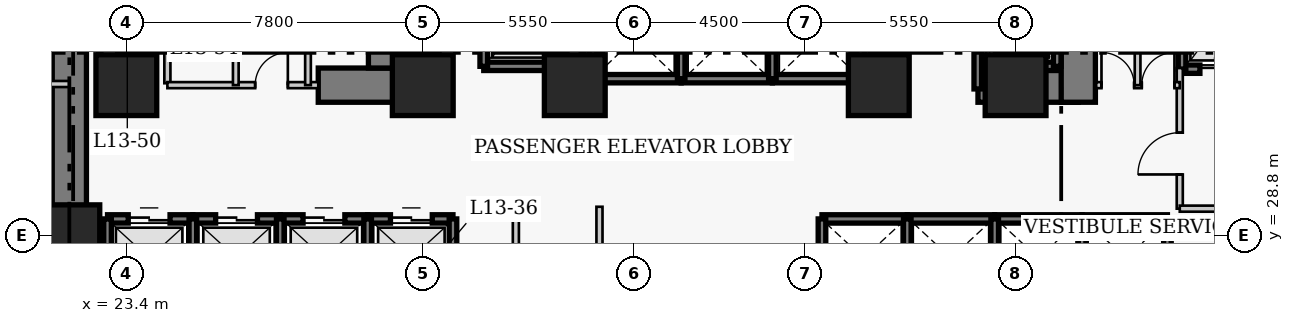
"""IFC4 building model, lengths in metres.
Left out: names, types, materials, properties, quantities, classifications, styles, units other than length and angle.
Written with IfcOpenShell. Run it as: python <this file> out.ifc"""

import sys

from ifc_helpers import new_model, si_unit, direction, frame, frame_2d, origin, origin_2d, place, context, subcontext, project, spatial, rectangle, extrude, element, fill, save


model = new_model("IFC4")
c1 = context("Model", 3, precision=1e-05, world=origin(), true_north=direction((0.0, 1.0)))
c2 = subcontext(c1, "Body", "Model", "MODEL_VIEW")
j1 = project(units=[si_unit("LENGTHUNIT", "METRE"), si_unit("PLANEANGLEUNIT", "RADIAN")], contexts=[c1])
p1 = place(None, origin())
s1 = spatial("IfcSite", under=j1, at=p1, CompositionType="ELEMENT")
p2 = place(p1, origin())
s2 = spatial("IfcBuilding", under=s1, at=p2, CompositionType="ELEMENT")
p3 = place(p2, frame((0.0, 0.0, 56.4)))
s3 = spatial("IfcBuildingStorey", under=s2, at=p3, CompositionType="ELEMENT", Elevation=56.4)
p4 = place(p3, frame((21.9, 27.05, 0.0), z_axis=(0.0, 0.0, 1.0), x_axis=(0.0, 1.0, 0.0)))
e1 = element("IfcWall", 1, at=p4, inside=s3, PredefinedType="SHEAR", context=c2, shape_type="SweptSolid", body=[
    extrude(rectangle(XDim=13.72, YDim=0.9, at=frame_2d((6.86, 0.0))), origin(), (0.0, 0.0, 1.0), 3.8),
])
p5 = place(p3, frame((28.45, 32.75, 0.0), z_axis=(0.0, 0.0, 1.0), x_axis=(1.0, 0.0, 0.0)))
e2 = element("IfcWall", 2, at=p5, inside=s3, PredefinedType="SHEAR", context=c2, shape_type="SweptSolid", body=[
    extrude(rectangle(XDim=2.4, YDim=0.9, at=frame_2d((1.2, 0.0))), origin(), (0.0, 0.0, 1.0), 3.8),
])
p6 = place(p3, frame((45.81, 32.75, 0.0), z_axis=(0.0, 0.0, 1.0), x_axis=(1.0, 0.0, 0.0)))
e3 = element("IfcWall", 3, at=p6, inside=s3, PredefinedType="SHEAR", context=c2, shape_type="SweptSolid", body=[
    extrude(rectangle(XDim=2.64, YDim=0.9, at=frame_2d((1.32, 0.0))), origin(), (0.0, 0.0, 1.0), 3.8),
])
p7 = place(p3, frame((30.22, 33.2, 0.0), z_axis=(0.0, 0.0, 1.0), x_axis=(0.0, 1.0, 0.0)))
e4 = element("IfcWall", 4, at=p7, inside=s3, PredefinedType="SHEAR", context=c2, shape_type="SweptSolid", body=[
    extrude(rectangle(XDim=7.12, YDim=0.9, at=frame_2d((3.56, 0.0))), origin(), (0.0, 0.0, 1.0), 3.8),
])
p8 = place(p3, frame((48.45, 32.3, 0.0), z_axis=(0.0, 0.0, 1.0), x_axis=(0.0, 1.0, 0.0)))
e5 = element("IfcWall", 5, at=p8, inside=s3, PredefinedType="SHEAR", context=c2, shape_type="SweptSolid", body=[
    extrude(rectangle(XDim=8.02, YDim=0.9, at=frame_2d((4.01, 0.0))), origin(), (0.0, 0.0, 1.0), 3.8),
])
p9 = place(p8, frame((5.9, 0.0, 0.0)))
e6 = element("IfcOpeningElement", 6, at=p9, cuts=e5, PredefinedType="OPENING", context=c2, shape_type="SweptSolid", body=[
    extrude(rectangle(XDim=1.1, YDim=2.15, at=frame_2d((0.55, 1.075))), frame((0.0, 0.46, 0.0), z_axis=(0.0, -1.0, 0.0), x_axis=(1.0, 0.0, 0.0)), (0.0, 0.0, 1.0), 0.92),
])
for number, where, z_axis, x_axis in (
    (7, (21.9, 28.8, 0.0), (0.0, 0.0, 1.0), (1.0, 0.0, 0.0)),
    (8, (23.4, 32.75, 0.0), (0.0, 0.0, 1.0), (1.0, 0.0, 0.0)),
    (9, (31.2, 32.75, 0.0), (0.0, 0.0, 1.0), (1.0, 0.0, 0.0)),
    (10, (35.2, 32.75, 0.0), (0.0, 0.0, 1.0), (1.0, 0.0, 0.0)),
    (11, (43.2, 32.75, 0.0), (0.0, 0.0, 1.0), (1.0, 0.0, 0.0)),
    (12, (46.8, 32.75, 0.0), (0.0, 0.0, 1.0), (1.0, 0.0, 0.0)),
):
    element("IfcColumn", number, at=place(p3, frame(where, z_axis=z_axis, x_axis=x_axis)), inside=s3, PredefinedType="COLUMN", context=c2, shape_type="SweptSolid", body=[
        extrude(rectangle(XDim=1.6, YDim=1.6, at=origin_2d()), origin(), (0.0, 0.0, 1.0), 3.8),
    ])
p10 = place(p3, frame((22.905, 29.23, 0.0), z_axis=(0.0, 0.0, 1.0), x_axis=(1.0, 0.0, 0.0)))
e13 = element("IfcWall", 13, at=p10, inside=s3, PredefinedType="SHEAR", context=c2, shape_type="SweptSolid", body=[
    extrude(rectangle(XDim=2.245, YDim=0.22, at=frame_2d((1.123, 0.0))), origin(), (0.0, 0.0, 1.0), 3.8),
])
p11 = place(p10, frame((0.545, 0.0, 0.0)))
e14 = element("IfcOpeningElement", 14, at=p11, cuts=e13, PredefinedType="OPENING", context=c2, shape_type="SweptSolid", body=[
    extrude(rectangle(XDim=1.1, YDim=2.15, at=frame_2d((0.55, 1.075))), frame((0.0, 0.12, 0.0), z_axis=(0.0, -1.0, 0.0), x_axis=(1.0, 0.0, 0.0)), (0.0, 0.0, 1.0), 0.24),
])
p12 = place(p3, frame((22.905, 27.17, 0.0), z_axis=(0.0, 0.0, 1.0), x_axis=(0.0, 1.0, 0.0)))
e15 = element("IfcWall", 15, at=p12, inside=s3, PredefinedType="SHEAR", context=c2, shape_type="SweptSolid", body=[
    extrude(rectangle(XDim=2.06, YDim=0.2, at=frame_2d((1.03, 0.0))), origin(), (0.0, 0.0, 1.0), 3.8),
])
p13 = place(p3, frame((25.15, 29.23, 0.0), z_axis=(0.0, 0.0, 1.0), x_axis=(1.0, 0.0, 0.0)))
e16 = element("IfcWall", 16, at=p13, inside=s3, PredefinedType="SHEAR", context=c2, shape_type="SweptSolid", body=[
    extrude(rectangle(XDim=2.3, YDim=0.22, at=frame_2d((1.15, 0.0))), origin(), (0.0, 0.0, 1.0), 3.8),
])
p14 = place(p13, frame((0.6, 0.0, 0.0)))
e17 = element("IfcOpeningElement", 17, at=p14, cuts=e16, PredefinedType="OPENING", context=c2, shape_type="SweptSolid", body=[
    extrude(rectangle(XDim=1.1, YDim=2.15, at=frame_2d((0.55, 1.075))), frame((0.0, 0.12, 0.0), z_axis=(0.0, -1.0, 0.0), x_axis=(1.0, 0.0, 0.0)), (0.0, 0.0, 1.0), 0.24),
])
p15 = place(p3, frame((25.15, 27.17, 0.0), z_axis=(0.0, 0.0, 1.0), x_axis=(0.0, 1.0, 0.0)))
e18 = element("IfcWall", 18, at=p15, inside=s3, PredefinedType="SHEAR", context=c2, shape_type="SweptSolid", body=[
    extrude(rectangle(XDim=2.06, YDim=0.2, at=frame_2d((1.03, 0.0))), origin(), (0.0, 0.0, 1.0), 3.8),
])
p16 = place(p3, frame((27.45, 29.23, 0.0), z_axis=(0.0, 0.0, 1.0), x_axis=(1.0, 0.0, 0.0)))
e19 = element("IfcWall", 19, at=p16, inside=s3, PredefinedType="SHEAR", context=c2, shape_type="SweptSolid", body=[
    extrude(rectangle(XDim=2.3, YDim=0.22, at=frame_2d((1.15, 0.0))), origin(), (0.0, 0.0, 1.0), 3.8),
])
p17 = place(p16, frame((0.6, 0.0, 0.0)))
e20 = element("IfcOpeningElement", 20, at=p17, cuts=e19, PredefinedType="OPENING", context=c2, shape_type="SweptSolid", body=[
    extrude(rectangle(XDim=1.1, YDim=2.15, at=frame_2d((0.55, 1.075))), frame((0.0, 0.12, 0.0), z_axis=(0.0, -1.0, 0.0), x_axis=(1.0, 0.0, 0.0)), (0.0, 0.0, 1.0), 0.24),
])
p18 = place(p3, frame((27.45, 27.17, 0.0), z_axis=(0.0, 0.0, 1.0), x_axis=(0.0, 1.0, 0.0)))
e21 = element("IfcWall", 21, at=p18, inside=s3, PredefinedType="SHEAR", context=c2, shape_type="SweptSolid", body=[
    extrude(rectangle(XDim=2.06, YDim=0.2, at=frame_2d((1.03, 0.0))), origin(), (0.0, 0.0, 1.0), 3.8),
])
p19 = place(p3, frame((29.75, 29.23, 0.0), z_axis=(0.0, 0.0, 1.0), x_axis=(1.0, 0.0, 0.0)))
e22 = element("IfcWall", 22, at=p19, inside=s3, PredefinedType="SHEAR", context=c2, shape_type="SweptSolid", body=[
    extrude(rectangle(XDim=2.245, YDim=0.22, at=frame_2d((1.123, 0.0))), origin(), (0.0, 0.0, 1.0), 3.8),
])
p20 = place(p19, frame((0.6, 0.0, 0.0)))
e23 = element("IfcOpeningElement", 23, at=p20, cuts=e22, PredefinedType="OPENING", context=c2, shape_type="SweptSolid", body=[
    extrude(rectangle(XDim=1.1, YDim=2.15, at=frame_2d((0.55, 1.075))), frame((0.0, 0.12, 0.0), z_axis=(0.0, -1.0, 0.0), x_axis=(1.0, 0.0, 0.0)), (0.0, 0.0, 1.0), 0.24),
])
for number, where, z_axis, x_axis in (
    (24, (29.75, 27.17, 0.0), (0.0, 0.0, 1.0), (0.0, 1.0, 0.0)),
    (25, (31.995, 27.17, 0.0), (0.0, 0.0, 1.0), (0.0, 1.0, 0.0)),
):
    element("IfcWall", number, at=place(p3, frame(where, z_axis=z_axis, x_axis=x_axis)), inside=s3, PredefinedType="SHEAR", context=c2, shape_type="SweptSolid", body=[
        extrude(rectangle(XDim=2.06, YDim=0.2, at=frame_2d((1.03, 0.0))), origin(), (0.0, 0.0, 1.0), 3.8),
    ])
p21 = place(p3, frame((41.705, 29.23, 0.0), z_axis=(0.0, 0.0, 1.0), x_axis=(1.0, 0.0, 0.0)))
e26 = element("IfcWall", 26, at=p21, inside=s3, PredefinedType="SHEAR", context=c2, shape_type="SweptSolid", body=[
    extrude(rectangle(XDim=2.245, YDim=0.22, at=frame_2d((1.123, 0.0))), origin(), (0.0, 0.0, 1.0), 3.8),
])
p22 = place(p3, frame((41.705, 27.17, 0.0), z_axis=(0.0, 0.0, 1.0), x_axis=(0.0, 1.0, 0.0)))
e27 = element("IfcWall", 27, at=p22, inside=s3, PredefinedType="SHEAR", context=c2, shape_type="SweptSolid", body=[
    extrude(rectangle(XDim=2.06, YDim=0.2, at=frame_2d((1.03, 0.0))), origin(), (0.0, 0.0, 1.0), 3.8),
])
p23 = place(p3, frame((43.95, 29.23, 0.0), z_axis=(0.0, 0.0, 1.0), x_axis=(1.0, 0.0, 0.0)))
e28 = element("IfcWall", 28, at=p23, inside=s3, PredefinedType="SHEAR", context=c2, shape_type="SweptSolid", body=[
    extrude(rectangle(XDim=2.3, YDim=0.22, at=frame_2d((1.15, 0.0))), origin(), (0.0, 0.0, 1.0), 3.8),
])
p24 = place(p3, frame((43.95, 27.17, 0.0), z_axis=(0.0, 0.0, 1.0), x_axis=(0.0, 1.0, 0.0)))
e29 = element("IfcWall", 29, at=p24, inside=s3, PredefinedType="SHEAR", context=c2, shape_type="SweptSolid", body=[
    extrude(rectangle(XDim=2.06, YDim=0.2, at=frame_2d((1.03, 0.0))), origin(), (0.0, 0.0, 1.0), 3.8),
])
p25 = place(p3, frame((46.25, 29.23, 0.0), z_axis=(0.0, 0.0, 1.0), x_axis=(1.0, 0.0, 0.0)))
e30 = element("IfcWall", 30, at=p25, inside=s3, PredefinedType="SHEAR", context=c2, shape_type="SweptSolid", body=[
    extrude(rectangle(XDim=2.3, YDim=0.22, at=frame_2d((1.15, 0.0))), origin(), (0.0, 0.0, 1.0), 3.8),
])
p26 = place(p3, frame((46.25, 27.17, 0.0), z_axis=(0.0, 0.0, 1.0), x_axis=(0.0, 1.0, 0.0)))
e31 = element("IfcWall", 31, at=p26, inside=s3, PredefinedType="SHEAR", context=c2, shape_type="SweptSolid", body=[
    extrude(rectangle(XDim=2.06, YDim=0.2, at=frame_2d((1.03, 0.0))), origin(), (0.0, 0.0, 1.0), 3.8),
])
p27 = place(p3, frame((48.55, 29.23, 0.0), z_axis=(0.0, 0.0, 1.0), x_axis=(1.0, 0.0, 0.0)))
e32 = element("IfcWall", 32, at=p27, inside=s3, PredefinedType="SHEAR", context=c2, shape_type="SweptSolid", body=[
    extrude(rectangle(XDim=2.245, YDim=0.22, at=frame_2d((1.123, 0.0))), origin(), (0.0, 0.0, 1.0), 3.8),
])
for number, where, z_axis, x_axis in (
    (33, (48.55, 27.17, 0.0), (0.0, 0.0, 1.0), (0.0, 1.0, 0.0)),
    (34, (50.795, 27.17, 0.0), (0.0, 0.0, 1.0), (0.0, 1.0, 0.0)),
):
    element("IfcWall", number, at=place(p3, frame(where, z_axis=z_axis, x_axis=x_axis)), inside=s3, PredefinedType="SHEAR", context=c2, shape_type="SweptSolid", body=[
        extrude(rectangle(XDim=2.06, YDim=0.2, at=frame_2d((1.03, 0.0))), origin(), (0.0, 0.0, 1.0), 3.8),
    ])
p28 = place(p3, frame((35.68, 32.92, 0.0), z_axis=(0.0, 0.0, 1.0), x_axis=(1.0, 0.0, 0.0)))
e35 = element("IfcWall", 35, at=p28, inside=s3, PredefinedType="SHEAR", context=c2, shape_type="SweptSolid", body=[
    extrude(rectangle(XDim=2.32, YDim=0.22, at=frame_2d((1.16, 0.0))), origin(), (0.0, 0.0, 1.0), 3.8),
])
p29 = place(p3, frame((35.68, 32.92, 0.0), z_axis=(0.0, 0.0, 1.0), x_axis=(0.0, 1.0, 0.0)))
e36 = element("IfcWall", 36, at=p29, inside=s3, PredefinedType="SHEAR", context=c2, shape_type="SweptSolid", body=[
    extrude(rectangle(XDim=2.16, YDim=0.2, at=frame_2d((1.08, 0.0))), origin(), (0.0, 0.0, 1.0), 3.8),
])
p30 = place(p3, frame((38.0, 32.92, 0.0), z_axis=(0.0, 0.0, 1.0), x_axis=(1.0, 0.0, 0.0)))
e37 = element("IfcWall", 37, at=p30, inside=s3, PredefinedType="SHEAR", context=c2, shape_type="SweptSolid", body=[
    extrude(rectangle(XDim=2.4, YDim=0.22, at=frame_2d((1.2, 0.0))), origin(), (0.0, 0.0, 1.0), 3.8),
])
p31 = place(p3, frame((38.0, 32.92, 0.0), z_axis=(0.0, 0.0, 1.0), x_axis=(0.0, 1.0, 0.0)))
e38 = element("IfcWall", 38, at=p31, inside=s3, PredefinedType="SHEAR", context=c2, shape_type="SweptSolid", body=[
    extrude(rectangle(XDim=2.16, YDim=0.2, at=frame_2d((1.08, 0.0))), origin(), (0.0, 0.0, 1.0), 3.8),
])
p32 = place(p3, frame((40.4, 32.92, 0.0), z_axis=(0.0, 0.0, 1.0), x_axis=(1.0, 0.0, 0.0)))
e39 = element("IfcWall", 39, at=p32, inside=s3, PredefinedType="SHEAR", context=c2, shape_type="SweptSolid", body=[
    extrude(rectangle(XDim=2.32, YDim=0.22, at=frame_2d((1.16, 0.0))), origin(), (0.0, 0.0, 1.0), 3.8),
])
for number, where, z_axis, x_axis in (
    (40, (40.4, 32.92, 0.0), (0.0, 0.0, 1.0), (0.0, 1.0, 0.0)),
    (41, (42.72, 32.92, 0.0), (0.0, 0.0, 1.0), (0.0, 1.0, 0.0)),
):
    element("IfcWall", number, at=place(p3, frame(where, z_axis=z_axis, x_axis=x_axis)), inside=s3, PredefinedType="SHEAR", context=c2, shape_type="SweptSolid", body=[
        extrude(rectangle(XDim=2.16, YDim=0.2, at=frame_2d((1.08, 0.0))), origin(), (0.0, 0.0, 1.0), 3.8),
    ])
p33 = place(p3, frame((51.18, 33.17, 0.0), z_axis=(0.0, 0.0, 1.0), x_axis=(1.0, 0.0, 0.0)))
e42 = element("IfcWall", 42, at=p33, inside=s3, PredefinedType="SHEAR", context=c2, shape_type="SweptSolid", body=[
    extrude(rectangle(XDim=2.42, YDim=0.22, at=frame_2d((1.21, 0.0))), origin(), (0.0, 0.0, 1.0), 3.8),
])
p34 = place(p33, frame((0.47, 0.0, 0.0)))
e43 = element("IfcOpeningElement", 43, at=p34, cuts=e42, PredefinedType="OPENING", context=c2, shape_type="SweptSolid", body=[
    extrude(rectangle(XDim=1.3, YDim=2.15, at=frame_2d((0.65, 1.075))), frame((0.0, 0.12, 0.0), z_axis=(0.0, -1.0, 0.0), x_axis=(1.0, 0.0, 0.0)), (0.0, 0.0, 1.0), 0.24),
])
p35 = place(p3, frame((51.18, 33.17, 0.0), z_axis=(0.0, 0.0, 1.0), x_axis=(0.0, 1.0, 0.0)))
e44 = element("IfcWall", 44, at=p35, inside=s3, PredefinedType="SHEAR", context=c2, shape_type="SweptSolid", body=[
    extrude(rectangle(XDim=2.86, YDim=0.2, at=frame_2d((1.43, 0.0))), origin(), (0.0, 0.0, 1.0), 3.8),
])
p36 = place(p3, frame((32.805, 33.245, 0.0), z_axis=(0.0, 0.0, 1.0), x_axis=(1.0, 0.0, 0.0)))
e45 = element("IfcWall", 45, at=p36, inside=s3, PredefinedType="SHEAR", context=c2, shape_type="SweptSolid", body=[
    extrude(rectangle(XDim=2.09, YDim=0.22, at=frame_2d((1.045, 0.0))), origin(), (0.0, 0.0, 1.0), 3.8),
])
for number, where, z_axis, x_axis in (
    (46, (32.805, 33.245, 0.0), (0.0, 0.0, 1.0), (0.0, 1.0, 0.0)),
    (47, (34.895, 33.245, 0.0), (0.0, 0.0, 1.0), (0.0, 1.0, 0.0)),
):
    element("IfcWall", number, at=place(p3, frame(where, z_axis=z_axis, x_axis=x_axis)), inside=s3, PredefinedType="SHEAR", context=c2, shape_type="SweptSolid", body=[
        extrude(rectangle(XDim=2.91, YDim=0.2, at=frame_2d((1.455, 0.0))), origin(), (0.0, 0.0, 1.0), 3.8),
    ])
p37 = place(p3, frame((45.805, 33.245, 0.0), z_axis=(0.0, 0.0, 1.0), x_axis=(1.0, 0.0, 0.0)))
e48 = element("IfcWall", 48, at=p37, inside=s3, PredefinedType="SHEAR", context=c2, shape_type="SweptSolid", body=[
    extrude(rectangle(XDim=2.09, YDim=0.22, at=frame_2d((1.045, 0.0))), origin(), (0.0, 0.0, 1.0), 3.8),
])
p38 = place(p3, frame((45.805, 32.65, 0.0), z_axis=(0.0, 0.0, 1.0), x_axis=(0.0, 1.0, 0.0)))
e49 = element("IfcWall", 49, at=p38, inside=s3, PredefinedType="SHEAR", context=c2, shape_type="SweptSolid", body=[
    extrude(rectangle(XDim=3.505, YDim=0.2, at=frame_2d((1.752, 0.0))), origin(), (0.0, 0.0, 1.0), 3.8),
])
p39 = place(p3, frame((47.895, 33.245, 0.0), z_axis=(0.0, 0.0, 1.0), x_axis=(0.0, 1.0, 0.0)))
e50 = element("IfcWall", 50, at=p39, inside=s3, PredefinedType="SHEAR", context=c2, shape_type="SweptSolid", body=[
    extrude(rectangle(XDim=2.91, YDim=0.2, at=frame_2d((1.455, 0.0))), origin(), (0.0, 0.0, 1.0), 3.8),
])
p40 = place(p3, frame((24.48, 32.8, 0.0), z_axis=(0.0, 0.0, 1.0), x_axis=(0.0, 1.0, 0.0)))
e51 = element("IfcWall", 51, at=p40, inside=s3, PredefinedType="PARTITIONING", context=c2, shape_type="SweptSolid", body=[
    extrude(rectangle(XDim=3.57, YDim=0.16, at=frame_2d((1.785, 0.0))), origin(), (0.0, 0.0, 1.0), 3.54),
])
p41 = place(p40, frame((1.604, 0.0, 0.0)))
e52 = element("IfcOpeningElement", 52, at=p41, cuts=e51, PredefinedType="OPENING", context=c2, shape_type="SweptSolid", body=[
    extrude(rectangle(XDim=0.9, YDim=2.1, at=frame_2d((0.45, 1.05))), frame((0.0, 0.09, 0.0), z_axis=(0.0, -1.0, 0.0), x_axis=(1.0, 0.0, 0.0)), (0.0, 0.0, 1.0), 0.18),
])
p42 = place(p3, frame((51.12, 29.5, 0.0), z_axis=(0.0, 0.0, 1.0), x_axis=(0.0, 1.0, 0.0)))
e53 = element("IfcWall", 53, at=p42, inside=s3, PredefinedType="PARTITIONING", context=c2, shape_type="SweptSolid", body=[
    extrude(rectangle(XDim=3.7, YDim=0.16, at=frame_2d((1.85, 0.0))), origin(), (0.0, 0.0, 1.0), 3.54),
])
p43 = place(p42, frame((0.9, 0.0, 0.0)))
e54 = element("IfcOpeningElement", 54, at=p43, cuts=e53, PredefinedType="OPENING", context=c2, shape_type="SweptSolid", body=[
    extrude(rectangle(XDim=1.1, YDim=2.15, at=frame_2d((0.55, 1.075))), frame((0.0, 0.09, 0.0), z_axis=(0.0, -1.0, 0.0), x_axis=(1.0, 0.0, 0.0)), (0.0, 0.0, 1.0), 0.18),
])
p44 = place(p3, frame((51.12, 29.5, 0.0), z_axis=(0.0, 0.0, 1.0), x_axis=(1.0, 0.0, 0.0)))
e55 = element("IfcWall", 55, at=p44, inside=s3, PredefinedType="PARTITIONING", context=c2, shape_type="SweptSolid", body=[
    extrude(rectangle(XDim=5.63, YDim=0.16, at=frame_2d((2.815, 0.0))), origin(), (0.0, 0.0, 1.0), 3.54),
])
p45 = place(p3, frame((24.48, 32.75, 0.0), z_axis=(0.0, 0.0, 1.0), x_axis=(1.0, 0.0, 0.0)))
e56 = element("IfcWall", 56, at=p45, inside=s3, PredefinedType="PARTITIONING", context=c2, shape_type="SweptSolid", body=[
    extrude(rectangle(XDim=3.97, YDim=0.16, at=frame_2d((1.985, 0.0))), origin(), (0.0, 0.0, 1.0), 3.54),
])
p46 = place(p45, frame((2.31, 0.0, 0.0)))
e57 = element("IfcOpeningElement", 57, at=p46, cuts=e56, PredefinedType="OPENING", context=c2, shape_type="SweptSolid", body=[
    extrude(rectangle(XDim=0.86, YDim=2.05, at=frame_2d((0.43, 1.025))), frame((0.0, 0.09, 0.0), z_axis=(0.0, -1.0, 0.0), x_axis=(1.0, 0.0, 0.0)), (0.0, 0.0, 1.0), 0.18),
])
p47 = place(p3, frame((48.92, 32.75, 0.0), z_axis=(0.0, 0.0, 1.0), x_axis=(1.0, 0.0, 0.0)))
e58 = element("IfcWall", 58, at=p47, inside=s3, PredefinedType="PARTITIONING", context=c2, shape_type="SweptSolid", body=[
    extrude(rectangle(XDim=2.2, YDim=0.16, at=frame_2d((1.1, 0.0))), origin(), (0.0, 0.0, 1.0), 3.54),
])
p48 = place(p47, frame((0.14, 0.0, 0.0)))
e59 = element("IfcOpeningElement", 59, at=p48, cuts=e58, PredefinedType="OPENING", context=c2, shape_type="SweptSolid", body=[
    extrude(rectangle(XDim=0.86, YDim=2.05, at=frame_2d((0.43, 1.025))), frame((0.0, 0.09, 0.0), z_axis=(0.0, -1.0, 0.0), x_axis=(1.0, 0.0, 0.0)), (0.0, 0.0, 1.0), 0.18),
])
p49 = place(p47, frame((1.2, 0.0, 0.0)))
e60 = element("IfcOpeningElement", 60, at=p49, cuts=e58, PredefinedType="OPENING", context=c2, shape_type="SweptSolid", body=[
    extrude(rectangle(XDim=0.86, YDim=2.05, at=frame_2d((0.43, 1.025))), frame((0.0, 0.09, 0.0), z_axis=(0.0, -1.0, 0.0), x_axis=(1.0, 0.0, 0.0)), (0.0, 0.0, 1.0), 0.18),
])
for number, where, z_axis, x_axis in (
    (61, (26.28, 32.75, 0.0), (0.0, 0.0, 1.0), (0.0, 1.0, 0.0)),
    (62, (28.18, 32.75, 0.0), (0.0, 0.0, 1.0), (0.0, 1.0, 0.0)),
    (63, (50.01, 32.75, 0.0), (0.0, 0.0, 1.0), (0.0, 1.0, 0.0)),
):
    element("IfcWall", number, at=place(p3, frame(where, z_axis=z_axis, x_axis=x_axis)), inside=s3, PredefinedType="PARTITIONING", context=c2, shape_type="SweptSolid", body=[
        extrude(rectangle(XDim=3.62, YDim=0.15, at=frame_2d((1.81, 0.0))), origin(), (0.0, 0.0, 1.0), 3.54),
    ])
for number, where, z_axis, x_axis in (
    (64, (33.65, 25.31, 0.0), (0.0, 0.0, 1.0), (0.0, 1.0, 0.0)),
    (65, (35.85, 25.31, 0.0), (0.0, 0.0, 1.0), (0.0, 1.0, 0.0)),
):
    element("IfcWall", number, at=place(p3, frame(where, z_axis=z_axis, x_axis=x_axis)), inside=s3, PredefinedType="PARTITIONING", context=c2, shape_type="SweptSolid", body=[
        extrude(rectangle(XDim=4.24, YDim=0.16, at=frame_2d((2.12, 0.0))), origin(), (0.0, 0.0, 1.0), 3.54),
    ])
p50 = place(p3, frame((19.96, 32.78, 0.0), z_axis=(0.0, 0.0, 1.0), x_axis=(1.0, 0.0, 0.0)))
e66 = element("IfcWall", 66, at=p50, inside=s3, PredefinedType="PARTITIONING", context=c2, shape_type="SweptSolid", body=[
    extrude(rectangle(XDim=1.94, YDim=0.16, at=frame_2d((0.97, 0.0))), origin(), (0.0, 0.0, 1.0), 3.54),
])
p51 = place(p11, origin())
e67 = element("IfcDoor", 67, at=p51, inside=s3, OperationType="DOUBLE_DOOR_SLIDING", PredefinedType="DOOR", context=c2, shape_type="SweptSolid", body=[
    extrude(rectangle(XDim=1.1, YDim=2.15, at=frame_2d((0.55, 1.075))), frame((0.0, 0.025, 0.0), z_axis=(0.0, -1.0, 0.0), x_axis=(1.0, 0.0, 0.0)), (0.0, 0.0, 1.0), 0.05),
])
fill(e14, e67)
p52 = place(p14, origin())
e68 = element("IfcDoor", 68, at=p52, inside=s3, OperationType="DOUBLE_DOOR_SLIDING", PredefinedType="DOOR", context=c2, shape_type="SweptSolid", body=[
    extrude(rectangle(XDim=1.1, YDim=2.15, at=frame_2d((0.55, 1.075))), frame((0.0, 0.025, 0.0), z_axis=(0.0, -1.0, 0.0), x_axis=(1.0, 0.0, 0.0)), (0.0, 0.0, 1.0), 0.05),
])
fill(e17, e68)
p53 = place(p17, origin())
e69 = element("IfcDoor", 69, at=p53, inside=s3, OperationType="DOUBLE_DOOR_SLIDING", PredefinedType="DOOR", context=c2, shape_type="SweptSolid", body=[
    extrude(rectangle(XDim=1.1, YDim=2.15, at=frame_2d((0.55, 1.075))), frame((0.0, 0.025, 0.0), z_axis=(0.0, -1.0, 0.0), x_axis=(1.0, 0.0, 0.0)), (0.0, 0.0, 1.0), 0.05),
])
fill(e20, e69)
p54 = place(p20, origin())
e70 = element("IfcDoor", 70, at=p54, inside=s3, OperationType="DOUBLE_DOOR_SLIDING", PredefinedType="DOOR", context=c2, shape_type="SweptSolid", body=[
    extrude(rectangle(XDim=1.1, YDim=2.15, at=frame_2d((0.55, 1.075))), frame((0.0, 0.025, 0.0), z_axis=(0.0, -1.0, 0.0), x_axis=(1.0, 0.0, 0.0)), (0.0, 0.0, 1.0), 0.05),
])
fill(e23, e70)
p55 = place(p34, origin())
e71 = element("IfcDoor", 71, at=p55, inside=s3, OperationType="DOUBLE_DOOR_SLIDING", PredefinedType="DOOR", context=c2, shape_type="SweptSolid", body=[
    extrude(rectangle(XDim=1.3, YDim=2.15, at=frame_2d((0.65, 1.075))), frame((0.0, 0.025, 0.0), z_axis=(0.0, -1.0, 0.0), x_axis=(1.0, 0.0, 0.0)), (0.0, 0.0, 1.0), 0.05),
])
fill(e43, e71)
p56 = place(p43, origin())
e72 = element("IfcDoor", 72, at=p56, inside=s3, OperationType="SINGLE_SWING_LEFT", PredefinedType="DOOR", context=c2, shape_type="SweptSolid", body=[
    extrude(rectangle(XDim=1.1, YDim=2.15, at=frame_2d((0.55, 1.075))), frame((0.0, 0.025, 0.0), z_axis=(0.0, -1.0, 0.0), x_axis=(1.0, 0.0, 0.0)), (0.0, 0.0, 1.0), 0.05),
])
fill(e54, e72)
p57 = place(p46, origin())
e73 = element("IfcDoor", 73, at=p57, inside=s3, OperationType="SINGLE_SWING_RIGHT", PredefinedType="DOOR", context=c2, shape_type="SweptSolid", body=[
    extrude(rectangle(XDim=0.86, YDim=2.05, at=frame_2d((0.43, 1.025))), frame((0.0, 0.025, 0.0), z_axis=(0.0, -1.0, 0.0), x_axis=(1.0, 0.0, 0.0)), (0.0, 0.0, 1.0), 0.05),
])
fill(e57, e73)
p58 = place(p48, origin())
e74 = element("IfcDoor", 74, at=p58, inside=s3, OperationType="SINGLE_SWING_LEFT", PredefinedType="DOOR", context=c2, shape_type="SweptSolid", body=[
    extrude(rectangle(XDim=0.86, YDim=2.05, at=frame_2d((0.43, 1.025))), frame((0.0, 0.025, 0.0), z_axis=(0.0, -1.0, 0.0), x_axis=(1.0, 0.0, 0.0)), (0.0, 0.0, 1.0), 0.05),
])
fill(e59, e74)
p59 = place(p49, origin())
e75 = element("IfcDoor", 75, at=p59, inside=s3, OperationType="SINGLE_SWING_RIGHT", PredefinedType="DOOR", context=c2, shape_type="SweptSolid", body=[
    extrude(rectangle(XDim=0.86, YDim=2.05, at=frame_2d((0.43, 1.025))), frame((0.0, 0.025, 0.0), z_axis=(0.0, -1.0, 0.0), x_axis=(1.0, 0.0, 0.0)), (0.0, 0.0, 1.0), 0.05),
])
fill(e60, e75)
save(model, sys.argv[1])
